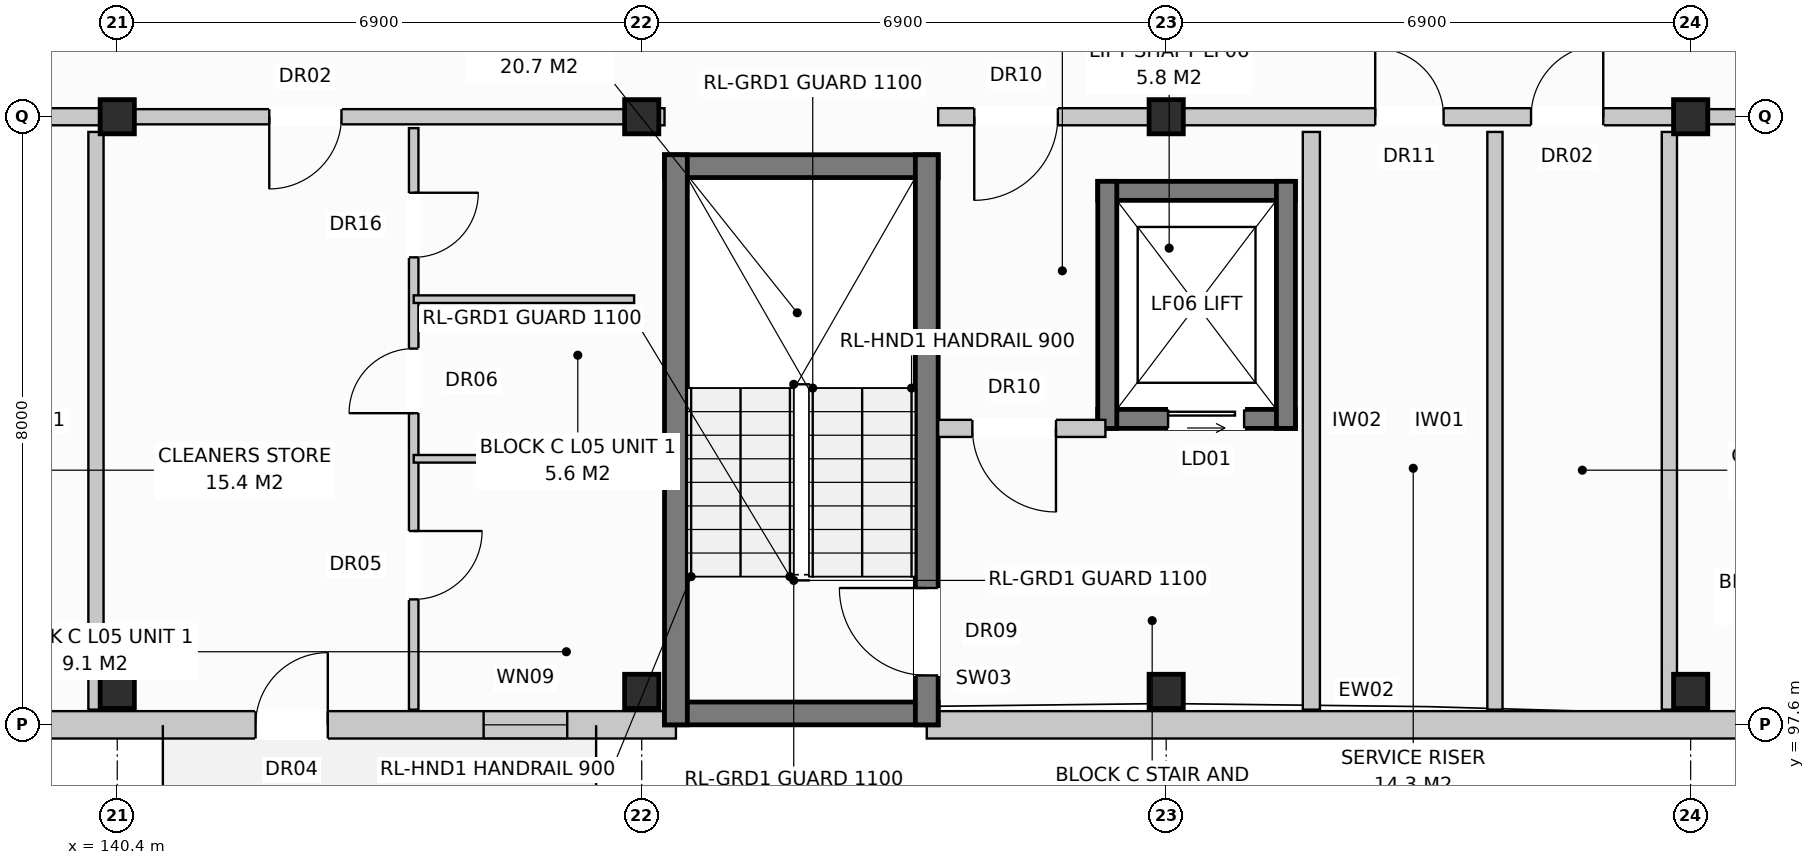
"""IFC4 building model, lengths in metres.
Left out: names, types, materials, properties, quantities, classifications, styles, units other than length and angle.
Written with IfcOpenShell. Run it as: python <this file> out.ifc"""

import sys

from ifc_helpers import new_model, si_unit, direction, frame, frame_2d, origin, origin_with_axes, origin_2d, place, context, subcontext, project, spatial, rectangle, extrude, element, fill, save


model = new_model("IFC4")
c1 = context("Model", 3, precision=1e-05, world=origin(), true_north=direction((0.0, 1.0)))
c2 = subcontext(c1, "Body", "Model", "MODEL_VIEW")
j1 = project(units=[si_unit("LENGTHUNIT", "METRE"), si_unit("PLANEANGLEUNIT", "RADIAN")], contexts=[c1])
p1 = place(None, origin())
s1 = spatial("IfcSite", under=j1, at=p1, CompositionType="ELEMENT")
p2 = place(p1, origin())
s2 = spatial("IfcBuilding", under=s1, at=p2, CompositionType="ELEMENT")
p3 = place(p2, frame((0.0, 0.0, 17.6)))
s3 = spatial("IfcBuildingStorey", under=s2, at=p3, CompositionType="ELEMENT", Elevation=17.6)
for number, where, z_axis, x_axis in (
    (1, (140.4, 98.04, 0.0), (0.0, 0.0, 1.0), (1.0, 0.0, 0.0)),
    (2, (140.4, 105.6, 0.0), (0.0, 0.0, 1.0), (1.0, 0.0, 0.0)),
    (3, (147.3, 98.04, 0.0), (0.0, 0.0, 1.0), (1.0, 0.0, 0.0)),
    (4, (147.3, 105.6, 0.0), (0.0, 0.0, 1.0), (1.0, 0.0, 0.0)),
    (5, (154.2, 98.04, 0.0), (0.0, 0.0, 1.0), (1.0, 0.0, 0.0)),
    (6, (154.2, 105.6, 0.0), (0.0, 0.0, 1.0), (1.0, 0.0, 0.0)),
    (7, (161.1, 98.04, 0.0), (0.0, 0.0, 1.0), (1.0, 0.0, 0.0)),
    (8, (161.1, 105.6, 0.0), (0.0, 0.0, 1.0), (1.0, 0.0, 0.0)),
):
    element("IfcColumn", number, at=place(p3, frame(where, z_axis=z_axis, x_axis=x_axis)), inside=s3, PredefinedType="COLUMN", context=c2, shape_type="SweptSolid", body=[
        extrude(rectangle(XDim=0.45, YDim=0.45, at=origin_2d()), origin(), (0.0, 0.0, 1.0), 3.2),
    ])
p4 = place(p3, frame((130.35, 97.6, 0.0), z_axis=(0.0, 0.0, 1.0), x_axis=(1.0, 0.0, 0.0)))
e9 = element("IfcWall", 9, at=p4, inside=s3, PredefinedType="STANDARD", context=c2, shape_type="SweptSolid", body=[
    extrude(rectangle(XDim=17.4, YDim=0.36, at=frame_2d((8.7, 0.0))), origin(), (0.0, 0.0, 1.0), 2.95),
])
p5 = place(p4, frame((11.87, 0.0, 0.0)))
e10 = element("IfcOpeningElement", 10, at=p5, cuts=e9, PredefinedType="OPENING", context=c2, shape_type="SweptSolid", body=[
    extrude(rectangle(XDim=0.95, YDim=2.1, at=frame_2d((0.475, 1.05))), frame((0.0, 0.192, 0.0), z_axis=(0.0, -1.0, 0.0), x_axis=(1.0, 0.0, 0.0)), (0.0, 0.0, 1.0), 0.384),
])
p6 = place(p4, frame((14.87, 0.0, 0.72)))
e11 = element("IfcOpeningElement", 11, at=p6, cuts=e9, PredefinedType="OPENING", context=c2, shape_type="SweptSolid", body=[
    extrude(rectangle(XDim=1.1, YDim=1.5, at=frame_2d((0.55, 0.75))), frame((0.0, 0.192, 0.0), z_axis=(0.0, -1.0, 0.0), x_axis=(1.0, 0.0, 0.0)), (0.0, 0.0, 1.0), 0.384),
])
p7 = place(p3, frame((151.05, 97.6, 0.0), z_axis=(0.0, 0.0, 1.0), x_axis=(1.0, 0.0, 0.0)))
e12 = element("IfcWall", 12, at=p7, inside=s3, PredefinedType="STANDARD", context=c2, shape_type="SweptSolid", body=[
    extrude(rectangle(XDim=16.78, YDim=0.36, at=frame_2d((8.39, 0.0))), origin(), (0.0, 0.0, 1.0), 2.95),
])
p8 = place(p7, frame((11.32, 0.0, 0.8)))
e13 = element("IfcOpeningElement", 13, at=p8, cuts=e12, PredefinedType="OPENING", context=c2, shape_type="SweptSolid", body=[
    extrude(rectangle(XDim=1.8, YDim=1.7, at=frame_2d((0.9, 0.85))), frame((0.0, 0.192, 0.0), z_axis=(0.0, -1.0, 0.0), x_axis=(1.0, 0.0, 0.0)), (0.0, 0.0, 1.0), 0.384),
])
p9 = place(p7, frame((14.97, 0.0, 0.72)))
e14 = element("IfcOpeningElement", 14, at=p9, cuts=e12, PredefinedType="OPENING", context=c2, shape_type="SweptSolid", body=[
    extrude(rectangle(XDim=1.1, YDim=1.5, at=frame_2d((0.55, 0.75))), frame((0.0, 0.192, 0.0), z_axis=(0.0, -1.0, 0.0), x_axis=(1.0, 0.0, 0.0)), (0.0, 0.0, 1.0), 0.384),
])
p10 = place(p3, frame((140.12, 97.8, 0.0), z_axis=(0.0, 0.0, 1.0), x_axis=(0.0, 1.0, 0.0)))
e15 = element("IfcWall", 15, at=p10, inside=s3, PredefinedType="PARTITIONING", context=c2, shape_type="SweptSolid", body=[
    extrude(rectangle(XDim=7.6, YDim=0.2, at=frame_2d((3.8, 0.0))), origin(), (0.0, 0.0, 1.0), 2.95),
])
p11 = place(p3, frame((130.5, 105.6, 0.0), z_axis=(0.0, 0.0, 1.0), x_axis=(1.0, 0.0, 0.0)))
e16 = element("IfcWall", 16, at=p11, inside=s3, PredefinedType="PARTITIONING", context=c2, shape_type="SweptSolid", body=[
    extrude(rectangle(XDim=9.9, YDim=0.225, at=frame_2d((4.95, 0.0))), origin(), (0.0, 0.0, 1.0), 2.39),
])
p12 = place(p11, frame((0.475, 0.0, 0.0)))
e17 = element("IfcOpeningElement", 17, at=p12, cuts=e16, PredefinedType="OPENING", context=c2, shape_type="SweptSolid", body=[
    extrude(rectangle(XDim=1.1, YDim=2.15, at=frame_2d((0.55, 1.075))), frame((0.0, 0.125, 0.0), z_axis=(0.0, -1.0, 0.0), x_axis=(1.0, 0.0, 0.0)), (0.0, 0.0, 1.0), 0.249),
])
p13 = place(p11, frame((5.75, 0.0, 0.0)))
e18 = element("IfcOpeningElement", 18, at=p13, cuts=e16, PredefinedType="OPENING", context=c2, shape_type="SweptSolid", body=[
    extrude(rectangle(XDim=0.9, YDim=2.1, at=frame_2d((0.45, 1.05))), frame((0.0, 0.125, 0.0), z_axis=(0.0, -1.0, 0.0), x_axis=(1.0, 0.0, 0.0)), (0.0, 0.0, 1.0), 0.249),
])
p14 = place(p11, frame((7.8, 0.0, 0.0)))
e19 = element("IfcOpeningElement", 19, at=p14, cuts=e16, PredefinedType="OPENING", context=c2, shape_type="SweptSolid", body=[
    extrude(rectangle(XDim=0.95, YDim=2.15, at=frame_2d((0.475, 1.075))), frame((0.0, 0.125, 0.0), z_axis=(0.0, -1.0, 0.0), x_axis=(1.0, 0.0, 0.0)), (0.0, 0.0, 1.0), 0.249),
])
for number, where, z_axis, x_axis in (
    (20, (147.6, 97.75, 0.0), (0.0, 0.0, 1.0), (1.0, 0.0, 0.0)),
    (21, (147.6, 104.95, 0.0), (0.0, 0.0, 1.0), (1.0, 0.0, 0.0)),
):
    element("IfcWall", number, at=place(p3, frame(where, z_axis=z_axis, x_axis=x_axis)), inside=s3, PredefinedType="SHEAR", context=c2, shape_type="SweptSolid", body=[
        extrude(rectangle(XDim=3.6, YDim=0.3, at=frame_2d((1.8, 0.0))), origin(), (0.0, 0.0, 1.0), 2.95),
    ])
p15 = place(p3, frame((147.75, 97.6, 0.0), z_axis=(0.0, 0.0, 1.0), x_axis=(0.0, 1.0, 0.0)))
e22 = element("IfcWall", 22, at=p15, inside=s3, PredefinedType="SHEAR", context=c2, shape_type="SweptSolid", body=[
    extrude(rectangle(XDim=7.5, YDim=0.3, at=frame_2d((3.75, 0.0))), origin(), (0.0, 0.0, 1.0), 2.95),
])
p16 = place(p3, frame((151.05, 97.6, 0.0), z_axis=(0.0, 0.0, 1.0), x_axis=(0.0, 1.0, 0.0)))
e23 = element("IfcWall", 23, at=p16, inside=s3, PredefinedType="SHEAR", context=c2, shape_type="SweptSolid", body=[
    extrude(rectangle(XDim=7.5, YDim=0.3, at=frame_2d((3.75, 0.0))), origin(), (0.0, 0.0, 1.0), 2.95),
])
p17 = place(p16, frame((0.65, 0.0, 0.0)))
e24 = element("IfcOpeningElement", 24, at=p17, cuts=e23, PredefinedType="OPENING", context=c2, shape_type="SweptSolid", body=[
    extrude(rectangle(XDim=1.15, YDim=2.15, at=frame_2d((0.575, 1.075))), frame((0.0, 0.162, 0.0), z_axis=(0.0, -1.0, 0.0), x_axis=(1.0, 0.0, 0.0)), (0.0, 0.0, 1.0), 0.324),
])
p18 = place(p3, frame((153.3, 101.625, 0.0), z_axis=(0.0, 0.0, 1.0), x_axis=(1.0, 0.0, 0.0)))
e25 = element("IfcWall", 25, at=p18, inside=s3, PredefinedType="SHEAR", context=c2, shape_type="SweptSolid", body=[
    extrude(rectangle(XDim=2.6, YDim=0.25, at=frame_2d((1.3, 0.0))), origin(), (0.0, 0.0, 1.0), 2.95),
])
p19 = place(p18, frame((0.925, 0.0, 0.0)))
e26 = element("IfcOpeningElement", 26, at=p19, cuts=e25, PredefinedType="OPENING", context=c2, shape_type="SweptSolid", body=[
    extrude(rectangle(XDim=1.0, YDim=2.1, at=frame_2d((0.5, 1.05))), frame((0.0, 0.137, 0.0), z_axis=(0.0, -1.0, 0.0), x_axis=(1.0, 0.0, 0.0)), (0.0, 0.0, 1.0), 0.274),
])
p20 = place(p3, frame((153.3, 104.625, 0.0), z_axis=(0.0, 0.0, 1.0), x_axis=(1.0, 0.0, 0.0)))
e27 = element("IfcWall", 27, at=p20, inside=s3, PredefinedType="SHEAR", context=c2, shape_type="SweptSolid", body=[
    extrude(rectangle(XDim=2.6, YDim=0.25, at=frame_2d((1.3, 0.0))), origin(), (0.0, 0.0, 1.0), 2.95),
])
for number, where, z_axis, x_axis in (
    (28, (153.425, 101.5, 0.0), (0.0, 0.0, 1.0), (0.0, 1.0, 0.0)),
    (29, (155.775, 101.5, 0.0), (0.0, 0.0, 1.0), (0.0, 1.0, 0.0)),
):
    element("IfcWall", number, at=place(p3, frame(where, z_axis=z_axis, x_axis=x_axis)), inside=s3, PredefinedType="SHEAR", context=c2, shape_type="SweptSolid", body=[
        extrude(rectangle(XDim=3.25, YDim=0.25, at=frame_2d((1.625, 0.0))), origin(), (0.0, 0.0, 1.0), 2.95),
    ])
p21 = place(p3, frame((156.11, 97.8, 0.0), z_axis=(0.0, 0.0, 1.0), x_axis=(0.0, 1.0, 0.0)))
e30 = element("IfcWall", 30, at=p21, inside=s3, PredefinedType="PARTITIONING", context=c2, shape_type="SweptSolid", body=[
    extrude(rectangle(XDim=7.6, YDim=0.225, at=frame_2d((3.8, 0.0))), origin(), (0.0, 0.0, 1.0), 2.59),
])
p22 = place(p3, frame((151.2, 101.5, 0.0), z_axis=(0.0, 0.0, 1.0), x_axis=(1.0, 0.0, 0.0)))
e31 = element("IfcWall", 31, at=p22, inside=s3, PredefinedType="PARTITIONING", context=c2, shape_type="SweptSolid", body=[
    extrude(rectangle(XDim=2.2, YDim=0.225, at=frame_2d((1.1, 0.0))), origin(), (0.0, 0.0, 1.0), 2.95),
])
p23 = place(p22, frame((0.45, 0.0, 0.0)))
e32 = element("IfcOpeningElement", 32, at=p23, cuts=e31, PredefinedType="OPENING", context=c2, shape_type="SweptSolid", body=[
    extrude(rectangle(XDim=1.1, YDim=2.15, at=frame_2d((0.55, 1.075))), frame((0.0, 0.125, 0.0), z_axis=(0.0, -1.0, 0.0), x_axis=(1.0, 0.0, 0.0)), (0.0, 0.0, 1.0), 0.249),
])
p24 = place(p3, frame((147.3, 105.6, 0.0), z_axis=(0.0, 0.0, 1.0), x_axis=(1.0, 0.0, 0.0)))
e33 = element("IfcWall", 33, at=p24, inside=s3, PredefinedType="PARTITIONING", context=c2, shape_type="SweptSolid", body=[
    extrude(rectangle(XDim=0.3, YDim=0.225, at=frame_2d((0.15, 0.0))), origin(), (0.0, 0.0, 1.0), 2.95),
])
p25 = place(p3, frame((158.525, 97.8, 0.0), z_axis=(0.0, 0.0, 1.0), x_axis=(0.0, 1.0, 0.0)))
e34 = element("IfcWall", 34, at=p25, inside=s3, PredefinedType="PARTITIONING", context=c2, shape_type="SweptSolid", body=[
    extrude(rectangle(XDim=7.6, YDim=0.2, at=frame_2d((3.8, 0.0))), origin(), (0.0, 0.0, 1.0), 2.95),
])
p26 = place(p3, frame((160.82, 97.8, 0.0), z_axis=(0.0, 0.0, 1.0), x_axis=(0.0, 1.0, 0.0)))
e35 = element("IfcWall", 35, at=p26, inside=s3, PredefinedType="PARTITIONING", context=c2, shape_type="SweptSolid", body=[
    extrude(rectangle(XDim=7.6, YDim=0.2, at=frame_2d((3.8, 0.0))), origin(), (0.0, 0.0, 1.0), 2.39),
])
p27 = place(p3, frame((151.2, 105.6, 0.0), z_axis=(0.0, 0.0, 1.0), x_axis=(1.0, 0.0, 0.0)))
e36 = element("IfcWall", 36, at=p27, inside=s3, PredefinedType="PARTITIONING", context=c2, shape_type="SweptSolid", body=[
    extrude(rectangle(XDim=9.9, YDim=0.225, at=frame_2d((4.95, 0.0))), origin(), (0.0, 0.0, 1.0), 2.39),
])
p28 = place(p27, frame((0.475, 0.0, 0.0)))
e37 = element("IfcOpeningElement", 37, at=p28, cuts=e36, PredefinedType="OPENING", context=c2, shape_type="SweptSolid", body=[
    extrude(rectangle(XDim=1.1, YDim=2.15, at=frame_2d((0.55, 1.075))), frame((0.0, 0.125, 0.0), z_axis=(0.0, -1.0, 0.0), x_axis=(1.0, 0.0, 0.0)), (0.0, 0.0, 1.0), 0.249),
])
p29 = place(p27, frame((5.75, 0.0, 0.0)))
e38 = element("IfcOpeningElement", 38, at=p29, cuts=e36, PredefinedType="OPENING", context=c2, shape_type="SweptSolid", body=[
    extrude(rectangle(XDim=0.9, YDim=2.1, at=frame_2d((0.45, 1.05))), frame((0.0, 0.125, 0.0), z_axis=(0.0, -1.0, 0.0), x_axis=(1.0, 0.0, 0.0)), (0.0, 0.0, 1.0), 0.249),
])
p30 = place(p27, frame((7.8, 0.0, 0.0)))
e39 = element("IfcOpeningElement", 39, at=p30, cuts=e36, PredefinedType="OPENING", context=c2, shape_type="SweptSolid", body=[
    extrude(rectangle(XDim=0.95, YDim=2.15, at=frame_2d((0.475, 1.075))), frame((0.0, 0.125, 0.0), z_axis=(0.0, -1.0, 0.0), x_axis=(1.0, 0.0, 0.0)), (0.0, 0.0, 1.0), 0.249),
])
p31 = place(p3, frame((140.4, 105.6, 0.0), z_axis=(0.0, 0.0, 1.0), x_axis=(1.0, 0.0, 0.0)))
e40 = element("IfcWall", 40, at=p31, inside=s3, PredefinedType="PARTITIONING", context=c2, shape_type="SweptSolid", body=[
    extrude(rectangle(XDim=6.9, YDim=0.2, at=frame_2d((3.45, 0.0))), origin(), (0.0, 0.0, 1.0), 2.39),
])
p32 = place(p31, frame((2.0, 0.0, 0.0)))
e41 = element("IfcOpeningElement", 41, at=p32, cuts=e40, PredefinedType="OPENING", context=c2, shape_type="SweptSolid", body=[
    extrude(rectangle(XDim=0.95, YDim=2.15, at=frame_2d((0.475, 1.075))), frame((0.0, 0.112, 0.0), z_axis=(0.0, -1.0, 0.0), x_axis=(1.0, 0.0, 0.0)), (0.0, 0.0, 1.0), 0.224),
])
p33 = place(p3, frame((144.3, 105.45, 0.0), z_axis=(0.0, 0.0, 1.0), x_axis=(0.0, -1.0, 0.0)))
e42 = element("IfcWall", 42, at=p33, inside=s3, PredefinedType="PARTITIONING", context=c2, shape_type="SweptSolid", body=[
    extrude(rectangle(XDim=7.65, YDim=0.125, at=frame_2d((3.825, 0.0))), origin(), (0.0, 0.0, 1.0), 2.95),
])
p34 = place(p33, frame((0.85, 0.0, 0.0)))
e43 = element("IfcOpeningElement", 43, at=p34, cuts=e42, PredefinedType="OPENING", context=c2, shape_type="SweptSolid", body=[
    extrude(rectangle(XDim=0.85, YDim=2.1, at=frame_2d((0.425, 1.05))), frame((0.0, 0.074, 0.0), z_axis=(0.0, -1.0, 0.0), x_axis=(1.0, 0.0, 0.0)), (0.0, 0.0, 1.0), 0.149),
])
p35 = place(p33, frame((2.9, 0.0, 0.0)))
e44 = element("IfcOpeningElement", 44, at=p35, cuts=e42, PredefinedType="OPENING", context=c2, shape_type="SweptSolid", body=[
    extrude(rectangle(XDim=0.85, YDim=2.05, at=frame_2d((0.425, 1.025))), frame((0.0, 0.074, 0.0), z_axis=(0.0, -1.0, 0.0), x_axis=(1.0, 0.0, 0.0)), (0.0, 0.0, 1.0), 0.149),
])
p36 = place(p33, frame((5.3, 0.0, 0.0)))
e45 = element("IfcOpeningElement", 45, at=p36, cuts=e42, PredefinedType="OPENING", context=c2, shape_type="SweptSolid", body=[
    extrude(rectangle(XDim=0.9, YDim=2.1, at=frame_2d((0.45, 1.05))), frame((0.0, 0.074, 0.0), z_axis=(0.0, -1.0, 0.0), x_axis=(1.0, 0.0, 0.0)), (0.0, 0.0, 1.0), 0.149),
])
for number, where, z_axis, x_axis in (
    (46, (144.3, 103.2, 0.0), (0.0, 0.0, 1.0), (1.0, 0.0, 0.0)),
    (47, (144.3, 101.1, 0.0), (0.0, 0.0, 1.0), (1.0, 0.0, 0.0)),
):
    element("IfcWall", number, at=place(p3, frame(where, z_axis=z_axis, x_axis=x_axis)), inside=s3, PredefinedType="PARTITIONING", context=c2, shape_type="SweptSolid", body=[
        extrude(rectangle(XDim=2.9, YDim=0.1, at=frame_2d((1.45, 0.0))), origin(), (0.0, 0.0, 1.0), 2.95),
    ])
p37 = place(p3, frame((161.1, 105.6, 0.0), z_axis=(0.0, 0.0, 1.0), x_axis=(1.0, 0.0, 0.0)))
e48 = element("IfcWall", 48, at=p37, inside=s3, PredefinedType="PARTITIONING", context=c2, shape_type="SweptSolid", body=[
    extrude(rectangle(XDim=6.9, YDim=0.2, at=frame_2d((3.45, 0.0))), origin(), (0.0, 0.0, 1.0), 2.39),
])
p38 = place(p37, frame((2.0, 0.0, 0.0)))
e49 = element("IfcOpeningElement", 49, at=p38, cuts=e48, PredefinedType="OPENING", context=c2, shape_type="SweptSolid", body=[
    extrude(rectangle(XDim=0.95, YDim=2.15, at=frame_2d((0.475, 1.075))), frame((0.0, 0.112, 0.0), z_axis=(0.0, -1.0, 0.0), x_axis=(1.0, 0.0, 0.0)), (0.0, 0.0, 1.0), 0.224),
])
p39 = place(p5, origin_with_axes())
e50 = element("IfcDoor", 50, at=p39, inside=s3, OperationType="SINGLE_SWING_RIGHT", PredefinedType="DOOR", context=c2, shape_type="SweptSolid", body=[
    extrude(rectangle(XDim=0.95, YDim=2.1, at=frame_2d((0.475, 1.05))), frame((0.0, 0.025, 0.0), z_axis=(0.0, -1.0, 0.0), x_axis=(1.0, 0.0, 0.0)), (0.0, 0.0, 1.0), 0.05),
])
fill(e10, e50)
p40 = place(p6, origin_with_axes())
e51 = element("IfcWindow", 51, at=p40, inside=s3, PartitioningType="SINGLE_PANEL", PredefinedType="WINDOW", context=c2, shape_type="SweptSolid", body=[
    extrude(rectangle(XDim=1.1, YDim=1.5, at=frame_2d((0.55, 0.75))), frame((0.0, 0.03, 0.0), z_axis=(0.0, -1.0, 0.0), x_axis=(1.0, 0.0, 0.0)), (0.0, 0.0, 1.0), 0.06),
])
fill(e11, e51)
p41 = place(p17, origin_with_axes())
e52 = element("IfcDoor", 52, at=p41, inside=s3, OperationType="SINGLE_SWING_RIGHT", PredefinedType="DOOR", context=c2, shape_type="SweptSolid", body=[
    extrude(rectangle(XDim=1.15, YDim=2.15, at=frame_2d((0.575, 1.075))), frame((0.0, 0.025, 0.0), z_axis=(0.0, -1.0, 0.0), x_axis=(1.0, 0.0, 0.0)), (0.0, 0.0, 1.0), 0.05),
])
fill(e24, e52)
p42 = place(p19, origin_with_axes())
e53 = element("IfcDoor", 53, at=p42, inside=s3, OperationType="SLIDING_TO_LEFT", PredefinedType="DOOR", context=c2, shape_type="SweptSolid", body=[
    extrude(rectangle(XDim=1.0, YDim=2.1, at=frame_2d((0.5, 1.05))), frame((0.0, 0.025, 0.0), z_axis=(0.0, -1.0, 0.0), x_axis=(1.0, 0.0, 0.0)), (0.0, 0.0, 1.0), 0.05),
])
fill(e26, e53)
p43 = place(p23, frame((1.1, 0.0, 0.0), z_axis=(0.0, 0.0, 1.0), x_axis=(-1.0, 0.0, 0.0)))
e54 = element("IfcDoor", 54, at=p43, inside=s3, OperationType="SINGLE_SWING_RIGHT", PredefinedType="DOOR", context=c2, shape_type="SweptSolid", body=[
    extrude(rectangle(XDim=1.1, YDim=2.15, at=frame_2d((0.55, 1.075))), frame((0.0, 0.025, 0.0), z_axis=(0.0, -1.0, 0.0), x_axis=(1.0, 0.0, 0.0)), (0.0, 0.0, 1.0), 0.05),
])
fill(e32, e54)
p44 = place(p28, frame((1.1, 0.0, 0.0), z_axis=(0.0, 0.0, 1.0), x_axis=(-1.0, 0.0, 0.0)))
e55 = element("IfcDoor", 55, at=p44, inside=s3, OperationType="SINGLE_SWING_LEFT", PredefinedType="DOOR", context=c2, shape_type="SweptSolid", body=[
    extrude(rectangle(XDim=1.1, YDim=2.15, at=frame_2d((0.55, 1.075))), frame((0.0, 0.025, 0.0), z_axis=(0.0, -1.0, 0.0), x_axis=(1.0, 0.0, 0.0)), (0.0, 0.0, 1.0), 0.05),
])
fill(e37, e55)
p45 = place(p29, origin_with_axes())
e56 = element("IfcDoor", 56, at=p45, inside=s3, OperationType="SINGLE_SWING_LEFT", PredefinedType="DOOR", context=c2, shape_type="SweptSolid", body=[
    extrude(rectangle(XDim=0.9, YDim=2.1, at=frame_2d((0.45, 1.05))), frame((0.0, 0.025, 0.0), z_axis=(0.0, -1.0, 0.0), x_axis=(1.0, 0.0, 0.0)), (0.0, 0.0, 1.0), 0.05),
])
fill(e38, e56)
p46 = place(p30, origin_with_axes())
e57 = element("IfcDoor", 57, at=p46, inside=s3, OperationType="SINGLE_SWING_RIGHT", PredefinedType="DOOR", context=c2, shape_type="SweptSolid", body=[
    extrude(rectangle(XDim=0.95, YDim=2.15, at=frame_2d((0.475, 1.075))), frame((0.0, 0.025, 0.0), z_axis=(0.0, -1.0, 0.0), x_axis=(1.0, 0.0, 0.0)), (0.0, 0.0, 1.0), 0.05),
])
fill(e39, e57)
p47 = place(p32, frame((0.95, 0.0, 0.0), z_axis=(0.0, 0.0, 1.0), x_axis=(-1.0, 0.0, 0.0)))
e58 = element("IfcDoor", 58, at=p47, inside=s3, OperationType="SINGLE_SWING_LEFT", PredefinedType="DOOR", context=c2, shape_type="SweptSolid", body=[
    extrude(rectangle(XDim=0.95, YDim=2.15, at=frame_2d((0.475, 1.075))), frame((0.0, 0.025, 0.0), z_axis=(0.0, -1.0, 0.0), x_axis=(1.0, 0.0, 0.0)), (0.0, 0.0, 1.0), 0.05),
])
fill(e41, e58)
p48 = place(p34, origin_with_axes())
e59 = element("IfcDoor", 59, at=p48, inside=s3, OperationType="SINGLE_SWING_LEFT", PredefinedType="DOOR", context=c2, shape_type="SweptSolid", body=[
    extrude(rectangle(XDim=0.85, YDim=2.1, at=frame_2d((0.425, 1.05))), frame((0.0, 0.025, 0.0), z_axis=(0.0, -1.0, 0.0), x_axis=(1.0, 0.0, 0.0)), (0.0, 0.0, 1.0), 0.05),
])
fill(e43, e59)
p49 = place(p35, frame((0.85, 0.0, 0.0), z_axis=(0.0, 0.0, 1.0), x_axis=(-1.0, 0.0, 0.0)))
e60 = element("IfcDoor", 60, at=p49, inside=s3, OperationType="SINGLE_SWING_RIGHT", PredefinedType="DOOR", context=c2, shape_type="SweptSolid", body=[
    extrude(rectangle(XDim=0.85, YDim=2.05, at=frame_2d((0.425, 1.025))), frame((0.0, 0.025, 0.0), z_axis=(0.0, -1.0, 0.0), x_axis=(1.0, 0.0, 0.0)), (0.0, 0.0, 1.0), 0.05),
])
fill(e44, e60)
p50 = place(p36, origin_with_axes())
e61 = element("IfcDoor", 61, at=p50, inside=s3, OperationType="SINGLE_SWING_LEFT", PredefinedType="DOOR", context=c2, shape_type="SweptSolid", body=[
    extrude(rectangle(XDim=0.9, YDim=2.1, at=frame_2d((0.45, 1.05))), frame((0.0, 0.025, 0.0), z_axis=(0.0, -1.0, 0.0), x_axis=(1.0, 0.0, 0.0)), (0.0, 0.0, 1.0), 0.05),
])
fill(e45, e61)
save(model, sys.argv[1])
